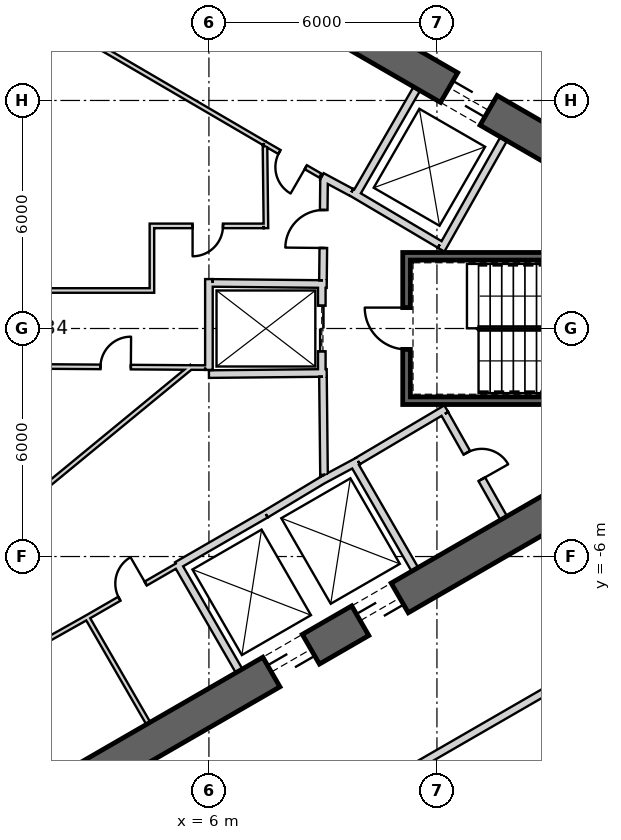
"""IFC4 building model, lengths in metres.
Left out: names, types, materials, properties, quantities, classifications, styles, units other than length and angle.
Written with IfcOpenShell. Run it as: python <this file> out.ifc"""

import sys

from ifc_helpers import new_model, si_unit, direction, frame, frame_2d, origin, place, context, subcontext, project, spatial, rectangle, extrude, element, fill, save


model = new_model("IFC4")
c1 = context("Model", 3, precision=1e-05, world=origin(), true_north=direction((0.0, 1.0)))
c2 = subcontext(c1, "Body", "Model", "MODEL_VIEW")
j1 = project(units=[si_unit("LENGTHUNIT", "METRE"), si_unit("PLANEANGLEUNIT", "RADIAN")], contexts=[c1])
p1 = place(None, origin())
s1 = spatial("IfcSite", under=j1, at=p1, CompositionType="ELEMENT")
p2 = place(p1, origin())
s2 = spatial("IfcBuilding", under=s1, at=p2, CompositionType="ELEMENT")
p3 = place(p2, frame((0.0, 0.0, 310.4)))
s3 = spatial("IfcBuildingStorey", under=s2, at=p3, CompositionType="ELEMENT", Elevation=310.4)
p4 = place(p3, frame((19.475, 2.208, 0.0), z_axis=(0.0, 0.0, 1.0), x_axis=(-0.866028369851, 0.499994862586, 0.0)))
e1 = element("IfcWall", 1, at=p4, inside=s3, PredefinedType="SHEAR", context=c2, shape_type="SweptSolid", body=[
    extrude(rectangle(XDim=31.523, YDim=0.9, at=frame_2d((15.762, 0.0))), origin(), (0.0, 0.0, 1.0), 3.9),
])
p5 = place(p4, frame((7.062, 0.0, 0.0)))
e2 = element("IfcOpeningElement", 2, at=p5, cuts=e1, PredefinedType="OPENING", context=c2, shape_type="SweptSolid", body=[
    extrude(rectangle(XDim=1.2, YDim=2.4, at=frame_2d((0.6, 1.2))), frame((0.0, 0.46, 0.0), z_axis=(0.0, -1.0, 0.0), x_axis=(1.0, 0.0, 0.0)), (0.0, 0.0, 1.0), 0.92),
])
p6 = place(p4, frame((3.612, 0.0, 0.0)))
e3 = element("IfcOpeningElement", 3, at=p6, cuts=e1, PredefinedType="OPENING", context=c2, shape_type="SweptSolid", body=[
    extrude(rectangle(XDim=1.2, YDim=2.4, at=frame_2d((0.6, 1.2))), frame((0.0, 0.46, 0.0), z_axis=(0.0, -1.0, 0.0), x_axis=(1.0, 0.0, 0.0)), (0.0, 0.0, 1.0), 0.92),
])
p7 = place(p4, frame((26.712, 0.0, 0.0)))
e4 = element("IfcOpeningElement", 4, at=p7, cuts=e1, PredefinedType="OPENING", context=c2, shape_type="SweptSolid", body=[
    extrude(rectangle(XDim=1.2, YDim=2.4, at=frame_2d((0.6, 1.2))), frame((0.0, 0.46, 0.0), z_axis=(0.0, -1.0, 0.0), x_axis=(1.0, 0.0, 0.0)), (0.0, 0.0, 1.0), 0.92),
])
p8 = place(p3, frame((-7.825, -17.97, 0.0), z_axis=(0.0, 0.0, 1.0), x_axis=(0.866028369851, 0.499994862586, 0.0)))
e5 = element("IfcWall", 5, at=p8, inside=s3, PredefinedType="SHEAR", context=c2, shape_type="SweptSolid", body=[
    extrude(rectangle(XDim=31.523, YDim=0.9, at=frame_2d((15.762, 0.0))), origin(), (0.0, 0.0, 1.0), 3.9),
])
p9 = place(p8, frame((17.862, 0.0, 0.0)))
e6 = element("IfcOpeningElement", 6, at=p9, cuts=e5, PredefinedType="OPENING", context=c2, shape_type="SweptSolid", body=[
    extrude(rectangle(XDim=1.2, YDim=2.4, at=frame_2d((0.6, 1.2))), frame((0.0, 0.46, 0.0), z_axis=(0.0, -1.0, 0.0), x_axis=(1.0, 0.0, 0.0)), (0.0, 0.0, 1.0), 0.92),
])
p10 = place(p8, frame((20.562, 0.0, 0.0)))
e7 = element("IfcOpeningElement", 7, at=p10, cuts=e5, PredefinedType="OPENING", context=c2, shape_type="SweptSolid", body=[
    extrude(rectangle(XDim=1.2, YDim=2.4, at=frame_2d((0.6, 1.2))), frame((0.0, 0.46, 0.0), z_axis=(0.0, -1.0, 0.0), x_axis=(1.0, 0.0, 0.0)), (0.0, 0.0, 1.0), 0.92),
])
p11 = place(p8, frame((26.712, 0.0, 0.0)))
e8 = element("IfcOpeningElement", 8, at=p11, cuts=e5, PredefinedType="OPENING", context=c2, shape_type="SweptSolid", body=[
    extrude(rectangle(XDim=1.2, YDim=2.4, at=frame_2d((0.6, 1.2))), frame((0.0, 0.46, 0.0), z_axis=(0.0, -1.0, 0.0), x_axis=(1.0, 0.0, 0.0)), (0.0, 0.0, 1.0), 0.92),
])
p12 = place(p8, frame((3.612, 0.0, 0.0)))
e9 = element("IfcOpeningElement", 9, at=p12, cuts=e5, PredefinedType="OPENING", context=c2, shape_type="SweptSolid", body=[
    extrude(rectangle(XDim=1.2, YDim=2.4, at=frame_2d((0.6, 1.2))), frame((0.0, 0.46, 0.0), z_axis=(0.0, -1.0, 0.0), x_axis=(1.0, 0.0, 0.0)), (0.0, 0.0, 1.0), 0.92),
])
p13 = place(p3, frame((9.847, 3.495, 0.0), z_axis=(0.0, 0.0, 1.0), x_axis=(0.499984717929, 0.866034226713, 0.0)))
e10 = element("IfcWall", 10, at=p13, inside=s3, PredefinedType="PLUMBINGWALL", context=c2, shape_type="SweptSolid", body=[
    extrude(rectangle(XDim=3.25, YDim=0.2, at=frame_2d((1.625, 0.0))), origin(), (0.0, 0.0, 1.0), 3.6),
])
p14 = place(p3, frame((12.11, 2.073, 0.0), z_axis=(0.0, 0.0, 1.0), x_axis=(0.49196600604, 0.870614408852, 0.0)))
e11 = element("IfcWall", 11, at=p14, inside=s3, PredefinedType="PLUMBINGWALL", context=c2, shape_type="SweptSolid", body=[
    extrude(rectangle(XDim=3.35, YDim=0.2, at=frame_2d((1.675, 0.0))), origin(), (0.0, 0.0, 1.0), 3.6),
])
p15 = place(p3, frame((12.073, 2.211, 0.0), z_axis=(0.0, 0.0, 1.0), x_axis=(-0.860414880418, 0.509594185166, 0.0)))
e12 = element("IfcWall", 12, at=p15, inside=s3, PredefinedType="PLUMBINGWALL", context=c2, shape_type="SweptSolid", body=[
    extrude(rectangle(XDim=2.7, YDim=0.2, at=frame_2d((1.35, 0.0))), origin(), (0.0, 0.0, 1.0), 3.6),
])
p16 = place(p3, frame((6.795, -9.01, 0.0), z_axis=(0.0, 0.0, 1.0), x_axis=(-0.499984717929, 0.866034226713, 0.0)))
e13 = element("IfcWall", 13, at=p16, inside=s3, PredefinedType="PLUMBINGWALL", context=c2, shape_type="SweptSolid", body=[
    extrude(rectangle(XDim=3.25, YDim=0.2, at=frame_2d((1.625, 0.0))), origin(), (0.0, 0.0, 1.0), 3.6),
])
p17 = place(p3, frame((5.159, -6.236, 0.0), z_axis=(0.0, 0.0, 1.0), x_axis=(0.866036505625, 0.499980770555, 0.0)))
e14 = element("IfcWall", 14, at=p17, inside=s3, PredefinedType="PLUMBINGWALL", context=c2, shape_type="SweptSolid", body=[
    extrude(rectangle(XDim=2.7, YDim=0.2, at=frame_2d((1.35, 0.0))), origin(), (0.0, 0.0, 1.0), 3.6),
])
p18 = place(p3, frame((9.795, -3.525, 0.0), z_axis=(0.0, 0.0, 1.0), x_axis=(0.499984717929, -0.866034226713, 0.0)))
e15 = element("IfcWall", 15, at=p18, inside=s3, PredefinedType="PLUMBINGWALL", context=c2, shape_type="SweptSolid", body=[
    extrude(rectangle(XDim=3.25, YDim=0.2, at=frame_2d((1.625, 0.0))), origin(), (0.0, 0.0, 1.0), 3.6),
])
p19 = place(p3, frame((8.974, -3.999, 0.0), z_axis=(0.0, 0.0, 1.0), x_axis=(0.880907015104, 0.473289373154, 0.0)))
e16 = element("IfcWall", 16, at=p19, inside=s3, PredefinedType="PLUMBINGWALL", context=c2, shape_type="SweptSolid", body=[
    extrude(rectangle(XDim=1.078, YDim=0.2, at=frame_2d((0.539, 0.0))), origin(), (0.0, 0.0, 1.0), 3.6),
])
p20 = place(p3, frame((7.497, -4.886, 0.0), z_axis=(0.0, 0.0, 1.0), x_axis=(0.857516281273, 0.51445682749, 0.0)))
e17 = element("IfcWall", 17, at=p20, inside=s3, PredefinedType="PLUMBINGWALL", context=c2, shape_type="SweptSolid", body=[
    extrude(rectangle(XDim=1.845, YDim=0.2, at=frame_2d((0.922, 0.0))), origin(), (0.0, 0.0, 1.0), 3.6),
])
p21 = place(p3, frame((19.2, 1.9, -0.3), z_axis=(0.0, 0.0, 1.0), x_axis=(-1.0, 0.0, 0.0)))
e18 = element("IfcWall", 18, at=p21, inside=s3, PredefinedType="SHEAR", context=c2, shape_type="SweptSolid", body=[
    extrude(rectangle(XDim=8.1, YDim=0.2, at=frame_2d((4.05, 0.0))), origin(), (0.0, 0.0, 1.0), 3.9),
])
p22 = place(p3, frame((11.1, -1.9, -0.3), z_axis=(0.0, 0.0, 1.0), x_axis=(1.0, 0.0, 0.0)))
e19 = element("IfcWall", 19, at=p22, inside=s3, PredefinedType="SHEAR", context=c2, shape_type="SweptSolid", body=[
    extrude(rectangle(XDim=7.9, YDim=0.2, at=frame_2d((3.95, 0.0))), origin(), (0.0, 0.0, 1.0), 3.9),
])
p23 = place(p3, frame((11.2, -1.8, -0.3), z_axis=(0.0, 0.0, 1.0), x_axis=(0.0, 1.0, 0.0)))
e20 = element("IfcWall", 20, at=p23, inside=s3, PredefinedType="SHEAR", context=c2, shape_type="SweptSolid", body=[
    extrude(rectangle(XDim=3.6, YDim=0.2, at=frame_2d((1.8, 0.0))), origin(), (0.0, 0.0, 1.0), 3.9),
])
p24 = place(p23, frame((1.25, 0.0, 0.3)))
e21 = element("IfcOpeningElement", 21, at=p24, cuts=e20, PredefinedType="OPENING", context=c2, shape_type="SweptSolid", body=[
    extrude(rectangle(XDim=1.1, YDim=2.1, at=frame_2d((0.55, 1.05))), frame((0.0, 0.11, 0.0), z_axis=(0.0, -1.0, 0.0), x_axis=(1.0, 0.0, 0.0)), (0.0, 0.0, 1.0), 0.22),
])
p25 = place(p3, frame((8.97, 1.2, 0.0), z_axis=(0.0, 0.0, 1.0), x_axis=(0.0, -1.0, 0.0)))
e22 = element("IfcWall", 22, at=p25, inside=s3, PredefinedType="PLUMBINGWALL", context=c2, shape_type="SweptSolid", body=[
    extrude(rectangle(XDim=2.4, YDim=0.2, at=frame_2d((1.2, 0.0))), origin(), (0.0, 0.0, 1.0), 3.6),
])
p26 = place(p25, frame((0.6, 0.0, 0.0)))
e23 = element("IfcOpeningElement", 23, at=p26, cuts=e22, PredefinedType="OPENING", context=c2, shape_type="SweptSolid", body=[
    extrude(rectangle(XDim=1.2, YDim=2.4, at=frame_2d((0.6, 1.2))), frame((0.0, 0.11, 0.0), z_axis=(0.0, -1.0, 0.0), x_axis=(1.0, 0.0, 0.0)), (0.0, 0.0, 1.0), 0.22),
])
p27 = place(p3, frame((9.1, -1.169, 0.0), z_axis=(0.0, 0.0, 1.0), x_axis=(-0.999949988, -0.010001074852, 0.0)))
e24 = element("IfcWall", 24, at=p27, inside=s3, PredefinedType="PLUMBINGWALL", context=c2, shape_type="SweptSolid", body=[
    extrude(rectangle(XDim=3.1, YDim=0.2, at=frame_2d((1.55, 0.0))), origin(), (0.0, 0.0, 1.0), 3.6),
])
p28 = place(p3, frame((6.0, -1.09, 0.0), z_axis=(0.0, 0.0, 1.0), x_axis=(0.0, 1.0, 0.0)))
e25 = element("IfcWall", 25, at=p28, inside=s3, PredefinedType="PLUMBINGWALL", context=c2, shape_type="SweptSolid", body=[
    extrude(rectangle(XDim=2.39, YDim=0.2, at=frame_2d((1.195, 0.0))), origin(), (0.0, 0.0, 1.0), 3.6),
])
p29 = place(p3, frame((9.1, 1.169, 0.0), z_axis=(0.0, 0.0, 1.0), x_axis=(-0.99994990606, 0.010009264196, 0.0)))
e26 = element("IfcWall", 26, at=p29, inside=s3, PredefinedType="PLUMBINGWALL", context=c2, shape_type="SweptSolid", body=[
    extrude(rectangle(XDim=3.0, YDim=0.2, at=frame_2d((1.5, 0.0))), origin(), (0.0, 0.0, 1.0), 3.6),
])
p30 = place(p3, frame((8.974, 3.999, 0.0), z_axis=(0.0, 0.0, 1.0), x_axis=(0.880917147855, -0.473270513147, 0.0)))
e27 = element("IfcWall", 27, at=p30, inside=s3, PredefinedType="PARTITIONING", context=c2, shape_type="SweptSolid", body=[
    extrude(rectangle(XDim=0.878, YDim=0.2, at=frame_2d((0.439, 0.0))), origin(), (0.0, 0.0, 1.0), 3.6),
])
p31 = place(p3, frame((7.457, 4.875, 0.0), z_axis=(0.0, 0.0, 1.0), x_axis=(-0.863262357411, 0.504755487615, 0.0)))
e28 = element("IfcWall", 28, at=p31, inside=s3, PredefinedType="PARTITIONING", context=c2, shape_type="SweptSolid", body=[
    extrude(rectangle(XDim=5.37, YDim=0.12, at=frame_2d((2.685, 0.0))), origin(), (0.0, 0.0, 1.0), 3.6),
])
p32 = place(p3, frame((7.457, 4.875, 0.0), z_axis=(0.0, 0.0, 1.0), x_axis=(0.866027945518, -0.499995597562, 0.0)))
e29 = element("IfcWall", 29, at=p32, inside=s3, PredefinedType="PARTITIONING", context=c2, shape_type="SweptSolid", body=[
    extrude(rectangle(XDim=1.702, YDim=0.12, at=frame_2d((0.851, 0.0))), origin(), (0.0, 0.0, 1.0), 3.6),
])
p33 = place(p32, frame((0.461, 0.0, 0.0)))
e30 = element("IfcOpeningElement", 30, at=p33, cuts=e29, PredefinedType="OPENING", context=c2, shape_type="SweptSolid", body=[
    extrude(rectangle(XDim=0.8, YDim=2.1, at=frame_2d((0.4, 1.05))), frame((0.0, 0.07, 0.0), z_axis=(0.0, -1.0, 0.0), x_axis=(1.0, 0.0, 0.0)), (0.0, 0.0, 1.0), 0.14),
])
p34 = place(p3, frame((4.405, -10.389, 0.0), z_axis=(0.0, 0.0, 1.0), x_axis=(-0.500017246033, 0.866015446554, 0.0)))
e31 = element("IfcWall", 31, at=p34, inside=s3, PredefinedType="PARTITIONING", context=c2, shape_type="SweptSolid", body=[
    extrude(rectangle(XDim=3.25, YDim=0.12, at=frame_2d((1.625, 0.0))), origin(), (0.0, 0.0, 1.0), 3.6),
])
p35 = place(p3, frame((0.494, -8.896, 0.0), z_axis=(0.0, 0.0, 1.0), x_axis=(0.871426548871, 0.490526013503, 0.0)))
e32 = element("IfcWall", 32, at=p35, inside=s3, PredefinedType="PARTITIONING", context=c2, shape_type="SweptSolid", body=[
    extrude(rectangle(XDim=2.67, YDim=0.12, at=frame_2d((1.335, 0.0))), origin(), (0.0, 0.0, 1.0), 3.6),
])
p36 = place(p3, frame((2.821, -7.586, 0.0), z_axis=(0.0, 0.0, 1.0), x_axis=(0.866019956843, 0.50000943426, 0.0)))
e33 = element("IfcWall", 33, at=p36, inside=s3, PredefinedType="PARTITIONING", context=c2, shape_type="SweptSolid", body=[
    extrude(rectangle(XDim=2.7, YDim=0.12, at=frame_2d((1.35, 0.0))), origin(), (0.0, 0.0, 1.0), 3.6),
])
p37 = place(p36, frame((0.95, 0.0, 0.0)))
e34 = element("IfcOpeningElement", 34, at=p37, cuts=e33, PredefinedType="OPENING", context=c2, shape_type="SweptSolid", body=[
    extrude(rectangle(XDim=0.8, YDim=2.1, at=frame_2d((0.4, 1.05))), frame((0.0, 0.07, 0.0), z_axis=(0.0, -1.0, 0.0), x_axis=(1.0, 0.0, 0.0)), (0.0, 0.0, 1.0), 0.14),
])
p38 = place(p3, frame((12.245, -2.109, 0.0), z_axis=(0.0, 0.0, 1.0), x_axis=(-0.860414880418, -0.509594185166, 0.0)))
e35 = element("IfcWall", 35, at=p38, inside=s3, PredefinedType="PARTITIONING", context=c2, shape_type="SweptSolid", body=[
    extrude(rectangle(XDim=2.7, YDim=0.2, at=frame_2d((1.35, 0.0))), origin(), (0.0, 0.0, 1.0), 3.6),
])
p39 = place(p3, frame((13.758, -4.99, 0.0), z_axis=(0.0, 0.0, 1.0), x_axis=(-0.491993409184, 0.87059892334, 0.0)))
e36 = element("IfcWall", 36, at=p39, inside=s3, PredefinedType="PARTITIONING", context=c2, shape_type="SweptSolid", body=[
    extrude(rectangle(XDim=3.15, YDim=0.2, at=frame_2d((1.575, 0.0))), origin(), (0.0, 0.0, 1.0), 3.6),
])
p40 = place(p39, frame((1.175, 0.0, 0.0)))
e37 = element("IfcOpeningElement", 37, at=p40, cuts=e36, PredefinedType="OPENING", context=c2, shape_type="SweptSolid", body=[
    extrude(rectangle(XDim=0.8, YDim=2.1, at=frame_2d((0.4, 1.05))), frame((0.0, 0.11, 0.0), z_axis=(0.0, -1.0, 0.0), x_axis=(1.0, 0.0, 0.0)), (0.0, 0.0, 1.0), 0.22),
])
p41 = place(p3, frame((9.029, -3.851, 0.0), z_axis=(0.0, 0.0, 1.0), x_axis=(-0.010784614026, 0.999941844359, 0.0)))
e38 = element("IfcWall", 38, at=p41, inside=s3, PredefinedType="PARTITIONING", context=c2, shape_type="SweptSolid", body=[
    extrude(rectangle(XDim=2.581, YDim=0.2, at=frame_2d((1.291, 0.0))), origin(), (0.0, 0.0, 1.0), 3.6),
])
p42 = place(p3, frame((9.001, 1.27, 0.0), z_axis=(0.0, 0.0, 1.0), x_axis=(0.010723968736, 0.999942496594, 0.0)))
e39 = element("IfcWall", 39, at=p42, inside=s3, PredefinedType="PARTITIONING", context=c2, shape_type="SweptSolid", body=[
    extrude(rectangle(XDim=2.709, YDim=0.2, at=frame_2d((1.354, 0.0))), origin(), (0.0, 0.0, 1.0), 3.6),
])
p43 = place(p42, frame((0.848, 0.0, 0.0)))
e40 = element("IfcOpeningElement", 40, at=p43, cuts=e39, PredefinedType="OPENING", context=c2, shape_type="SweptSolid", body=[
    extrude(rectangle(XDim=1.0, YDim=2.1, at=frame_2d((0.5, 1.05))), frame((0.0, 0.11, 0.0), z_axis=(0.0, -1.0, 0.0), x_axis=(1.0, 0.0, 0.0)), (0.0, 0.0, 1.0), 0.22),
])
p44 = place(p3, frame((5.548, -1.0, 0.0), z_axis=(0.0, 0.0, 1.0), x_axis=(-0.772345431507, -0.635202750648, 0.0)))
e41 = element("IfcWall", 41, at=p44, inside=s3, PredefinedType="PARTITIONING", context=c2, shape_type="SweptSolid", body=[
    extrude(rectangle(XDim=7.415, YDim=0.12, at=frame_2d((3.707, 0.0))), origin(), (0.0, 0.0, 1.0), 3.6),
])
p45 = place(p3, frame((5.9, -1.029, 0.0), z_axis=(0.0, 0.0, 1.0), x_axis=(-0.999977012451, 0.006780454946, 0.0)))
e42 = element("IfcWall", 42, at=p45, inside=s3, PredefinedType="PARTITIONING", context=c2, shape_type="SweptSolid", body=[
    extrude(rectangle(XDim=4.357, YDim=0.12, at=frame_2d((2.178, 0.0))), origin(), (0.0, 0.0, 1.0), 3.6),
])
p46 = place(p45, frame((1.954, 0.0, 0.0)))
e43 = element("IfcOpeningElement", 43, at=p46, cuts=e42, PredefinedType="OPENING", context=c2, shape_type="SweptSolid", body=[
    extrude(rectangle(XDim=0.8, YDim=2.1, at=frame_2d((0.4, 1.05))), frame((0.0, 0.07, 0.0), z_axis=(0.0, -1.0, 0.0), x_axis=(1.0, 0.0, 0.0)), (0.0, 0.0, 1.0), 0.14),
])
p47 = place(p3, frame((7.501, 2.64, 0.0), z_axis=(0.0, 0.0, 1.0), x_axis=(-0.01178388431, 0.999930567625, 0.0)))
e44 = element("IfcWall", 44, at=p47, inside=s3, PredefinedType="PARTITIONING", context=c2, shape_type="SweptSolid", body=[
    extrude(rectangle(XDim=2.155, YDim=0.12, at=frame_2d((1.077, 0.0))), origin(), (0.0, 0.0, 1.0), 3.6),
])
p48 = place(p3, frame((4.44, 2.7, 0.0), z_axis=(0.0, 0.0, 1.0), x_axis=(1.0, 0.0, 0.0)))
e45 = element("IfcWall", 45, at=p48, inside=s3, PredefinedType="PARTITIONING", context=c2, shape_type="SweptSolid", body=[
    extrude(rectangle(XDim=3.0, YDim=0.12, at=frame_2d((1.5, 0.0))), origin(), (0.0, 0.0, 1.0), 3.6),
])
p49 = place(p48, frame((1.13, 0.0, 0.0)))
e46 = element("IfcOpeningElement", 46, at=p49, cuts=e45, PredefinedType="OPENING", context=c2, shape_type="SweptSolid", body=[
    extrude(rectangle(XDim=0.8, YDim=2.1, at=frame_2d((0.4, 1.05))), frame((0.0, 0.07, 0.0), z_axis=(0.0, -1.0, 0.0), x_axis=(1.0, 0.0, 0.0)), (0.0, 0.0, 1.0), 0.14),
])
p50 = place(p3, frame((4.5, 0.94, 0.0), z_axis=(0.0, 0.0, 1.0), x_axis=(0.0, 1.0, 0.0)))
e47 = element("IfcWall", 47, at=p50, inside=s3, PredefinedType="PARTITIONING", context=c2, shape_type="SweptSolid", body=[
    extrude(rectangle(XDim=1.7, YDim=0.12, at=frame_2d((0.85, 0.0))), origin(), (0.0, 0.0, 1.0), 3.6),
])
p51 = place(p3, frame((1.542, 1.0, 0.0), z_axis=(0.0, 0.0, 1.0), x_axis=(1.0, 0.0, 0.0)))
e48 = element("IfcWall", 48, at=p51, inside=s3, PredefinedType="PARTITIONING", context=c2, shape_type="SweptSolid", body=[
    extrude(rectangle(XDim=2.898, YDim=0.12, at=frame_2d((1.449, 0.0))), origin(), (0.0, 0.0, 1.0), 3.6),
])
p52 = place(p3, frame((22.074, 5.153, 0.0), z_axis=(0.0, 0.0, 1.0), x_axis=(-0.866024844342, 0.500000968981, 0.0)))
e49 = element("IfcWall", 49, at=p52, inside=s3, PredefinedType="PARTITIONING", context=c2, shape_type="SweptSolid", body=[
    extrude(rectangle(XDim=17.073, YDim=0.2, at=frame_2d((8.536, 0.0))), origin(), (0.0, 0.0, 1.0), 2.88),
])
p53 = place(p52, frame((8.075, 0.0, 0.0)))
e50 = element("IfcOpeningElement", 50, at=p53, cuts=e49, PredefinedType="OPENING", context=c2, shape_type="SweptSolid", body=[
    extrude(rectangle(XDim=1.0, YDim=2.1, at=frame_2d((0.5, 1.05))), frame((0.0, 0.11, 0.0), z_axis=(0.0, -1.0, 0.0), x_axis=(1.0, 0.0, 0.0)), (0.0, 0.0, 1.0), 0.22),
])
p54 = place(p3, frame((1.451, -17.291, 0.0), z_axis=(0.0, 0.0, 1.0), x_axis=(0.866027540469, 0.499996299136, 0.0)))
e51 = element("IfcWall", 51, at=p54, inside=s3, PredefinedType="PARTITIONING", context=c2, shape_type="SweptSolid", body=[
    extrude(rectangle(XDim=15.82, YDim=0.2, at=frame_2d((7.91, 0.0))), origin(), (0.0, 0.0, 1.0), 2.97),
])
p55 = place(p54, frame((7.399, 0.0, 0.0)))
e52 = element("IfcOpeningElement", 52, at=p55, cuts=e51, PredefinedType="OPENING", context=c2, shape_type="SweptSolid", body=[
    extrude(rectangle(XDim=1.0, YDim=2.1, at=frame_2d((0.5, 1.05))), frame((0.0, 0.11, 0.0), z_axis=(0.0, -1.0, 0.0), x_axis=(1.0, 0.0, 0.0)), (0.0, 0.0, 1.0), 0.22),
])
p56 = place(p24, origin())
e53 = element("IfcDoor", 53, at=p56, inside=s3, OperationType="SINGLE_SWING_LEFT", PredefinedType="USERDEFINED", context=c2, shape_type="SweptSolid", body=[
    extrude(rectangle(XDim=1.1, YDim=2.1, at=frame_2d((0.55, 1.05))), frame((0.0, 0.025, 0.0), z_axis=(0.0, -1.0, 0.0), x_axis=(1.0, 0.0, 0.0)), (0.0, 0.0, 1.0), 0.05),
])
fill(e21, e53)
p57 = place(p43, origin())
e54 = element("IfcDoor", 54, at=p57, inside=s3, OperationType="SINGLE_SWING_LEFT", PredefinedType="USERDEFINED", context=c2, shape_type="SweptSolid", body=[
    extrude(rectangle(XDim=1.0, YDim=2.1, at=frame_2d((0.5, 1.05))), frame((0.0, 0.025, 0.0), z_axis=(0.0, -1.0, 0.0), x_axis=(1.0, 0.0, 0.0)), (0.0, 0.0, 1.0), 0.05),
])
fill(e40, e54)
p58 = place(p26, origin())
e55 = element("IfcDoor", 55, at=p58, inside=s3, OperationType="SLIDING_TO_LEFT", PredefinedType="USERDEFINED", context=c2, shape_type="SweptSolid", body=[
    extrude(rectangle(XDim=1.2, YDim=2.4, at=frame_2d((0.6, 1.2))), frame((0.0, 0.025, 0.0), z_axis=(0.0, -1.0, 0.0), x_axis=(1.0, 0.0, 0.0)), (0.0, 0.0, 1.0), 0.05),
])
fill(e23, e55)
p59 = place(p46, origin())
e56 = element("IfcDoor", 56, at=p59, inside=s3, OperationType="SINGLE_SWING_LEFT", PredefinedType="USERDEFINED", context=c2, shape_type="SweptSolid", body=[
    extrude(rectangle(XDim=0.8, YDim=2.1, at=frame_2d((0.4, 1.05))), frame((0.0, 0.025, 0.0), z_axis=(0.0, -1.0, 0.0), x_axis=(1.0, 0.0, 0.0)), (0.0, 0.0, 1.0), 0.05),
])
fill(e43, e56)
p60 = place(p49, origin())
e57 = element("IfcDoor", 57, at=p60, inside=s3, OperationType="SINGLE_SWING_LEFT", PredefinedType="USERDEFINED", context=c2, shape_type="SweptSolid", body=[
    extrude(rectangle(XDim=0.8, YDim=2.1, at=frame_2d((0.4, 1.05))), frame((0.0, 0.025, 0.0), z_axis=(0.0, -1.0, 0.0), x_axis=(1.0, 0.0, 0.0)), (0.0, 0.0, 1.0), 0.05),
])
fill(e46, e57)
p61 = place(p33, origin())
e58 = element("IfcDoor", 58, at=p61, inside=s3, OperationType="SINGLE_SWING_LEFT", PredefinedType="USERDEFINED", context=c2, shape_type="SweptSolid", body=[
    extrude(rectangle(XDim=0.8, YDim=2.1, at=frame_2d((0.4, 1.05))), frame((0.0, 0.025, 0.0), z_axis=(0.0, -1.0, 0.0), x_axis=(1.0, 0.0, 0.0)), (0.0, 0.0, 1.0), 0.05),
])
fill(e30, e58)
p62 = place(p37, origin())
e59 = element("IfcDoor", 59, at=p62, inside=s3, OperationType="SINGLE_SWING_RIGHT", PredefinedType="USERDEFINED", context=c2, shape_type="SweptSolid", body=[
    extrude(rectangle(XDim=0.8, YDim=2.1, at=frame_2d((0.4, 1.05))), frame((0.0, 0.025, 0.0), z_axis=(0.0, -1.0, 0.0), x_axis=(1.0, 0.0, 0.0)), (0.0, 0.0, 1.0), 0.05),
])
fill(e34, e59)
p63 = place(p40, origin())
e60 = element("IfcDoor", 60, at=p63, inside=s3, OperationType="SINGLE_SWING_RIGHT", PredefinedType="USERDEFINED", context=c2, shape_type="SweptSolid", body=[
    extrude(rectangle(XDim=0.8, YDim=2.1, at=frame_2d((0.4, 1.05))), frame((0.0, 0.025, 0.0), z_axis=(0.0, -1.0, 0.0), x_axis=(1.0, 0.0, 0.0)), (0.0, 0.0, 1.0), 0.05),
])
fill(e37, e60)
p64 = place(p5, origin())
e61 = element("IfcDoor", 61, at=p64, inside=s3, OperationType="SLIDING_TO_LEFT", PredefinedType="USERDEFINED", context=c2, shape_type="SweptSolid", body=[
    extrude(rectangle(XDim=1.2, YDim=2.4, at=frame_2d((0.6, 1.2))), frame((0.0, 0.025, 0.0), z_axis=(0.0, -1.0, 0.0), x_axis=(1.0, 0.0, 0.0)), (0.0, 0.0, 1.0), 0.05),
])
fill(e2, e61)
p65 = place(p9, origin())
e62 = element("IfcDoor", 62, at=p65, inside=s3, OperationType="SLIDING_TO_LEFT", PredefinedType="USERDEFINED", context=c2, shape_type="SweptSolid", body=[
    extrude(rectangle(XDim=1.2, YDim=2.4, at=frame_2d((0.6, 1.2))), frame((0.0, 0.025, 0.0), z_axis=(0.0, -1.0, 0.0), x_axis=(1.0, 0.0, 0.0)), (0.0, 0.0, 1.0), 0.05),
])
fill(e6, e62)
p66 = place(p10, origin())
e63 = element("IfcDoor", 63, at=p66, inside=s3, OperationType="SLIDING_TO_LEFT", PredefinedType="USERDEFINED", context=c2, shape_type="SweptSolid", body=[
    extrude(rectangle(XDim=1.2, YDim=2.4, at=frame_2d((0.6, 1.2))), frame((0.0, 0.025, 0.0), z_axis=(0.0, -1.0, 0.0), x_axis=(1.0, 0.0, 0.0)), (0.0, 0.0, 1.0), 0.05),
])
fill(e7, e63)
save(model, sys.argv[1])
